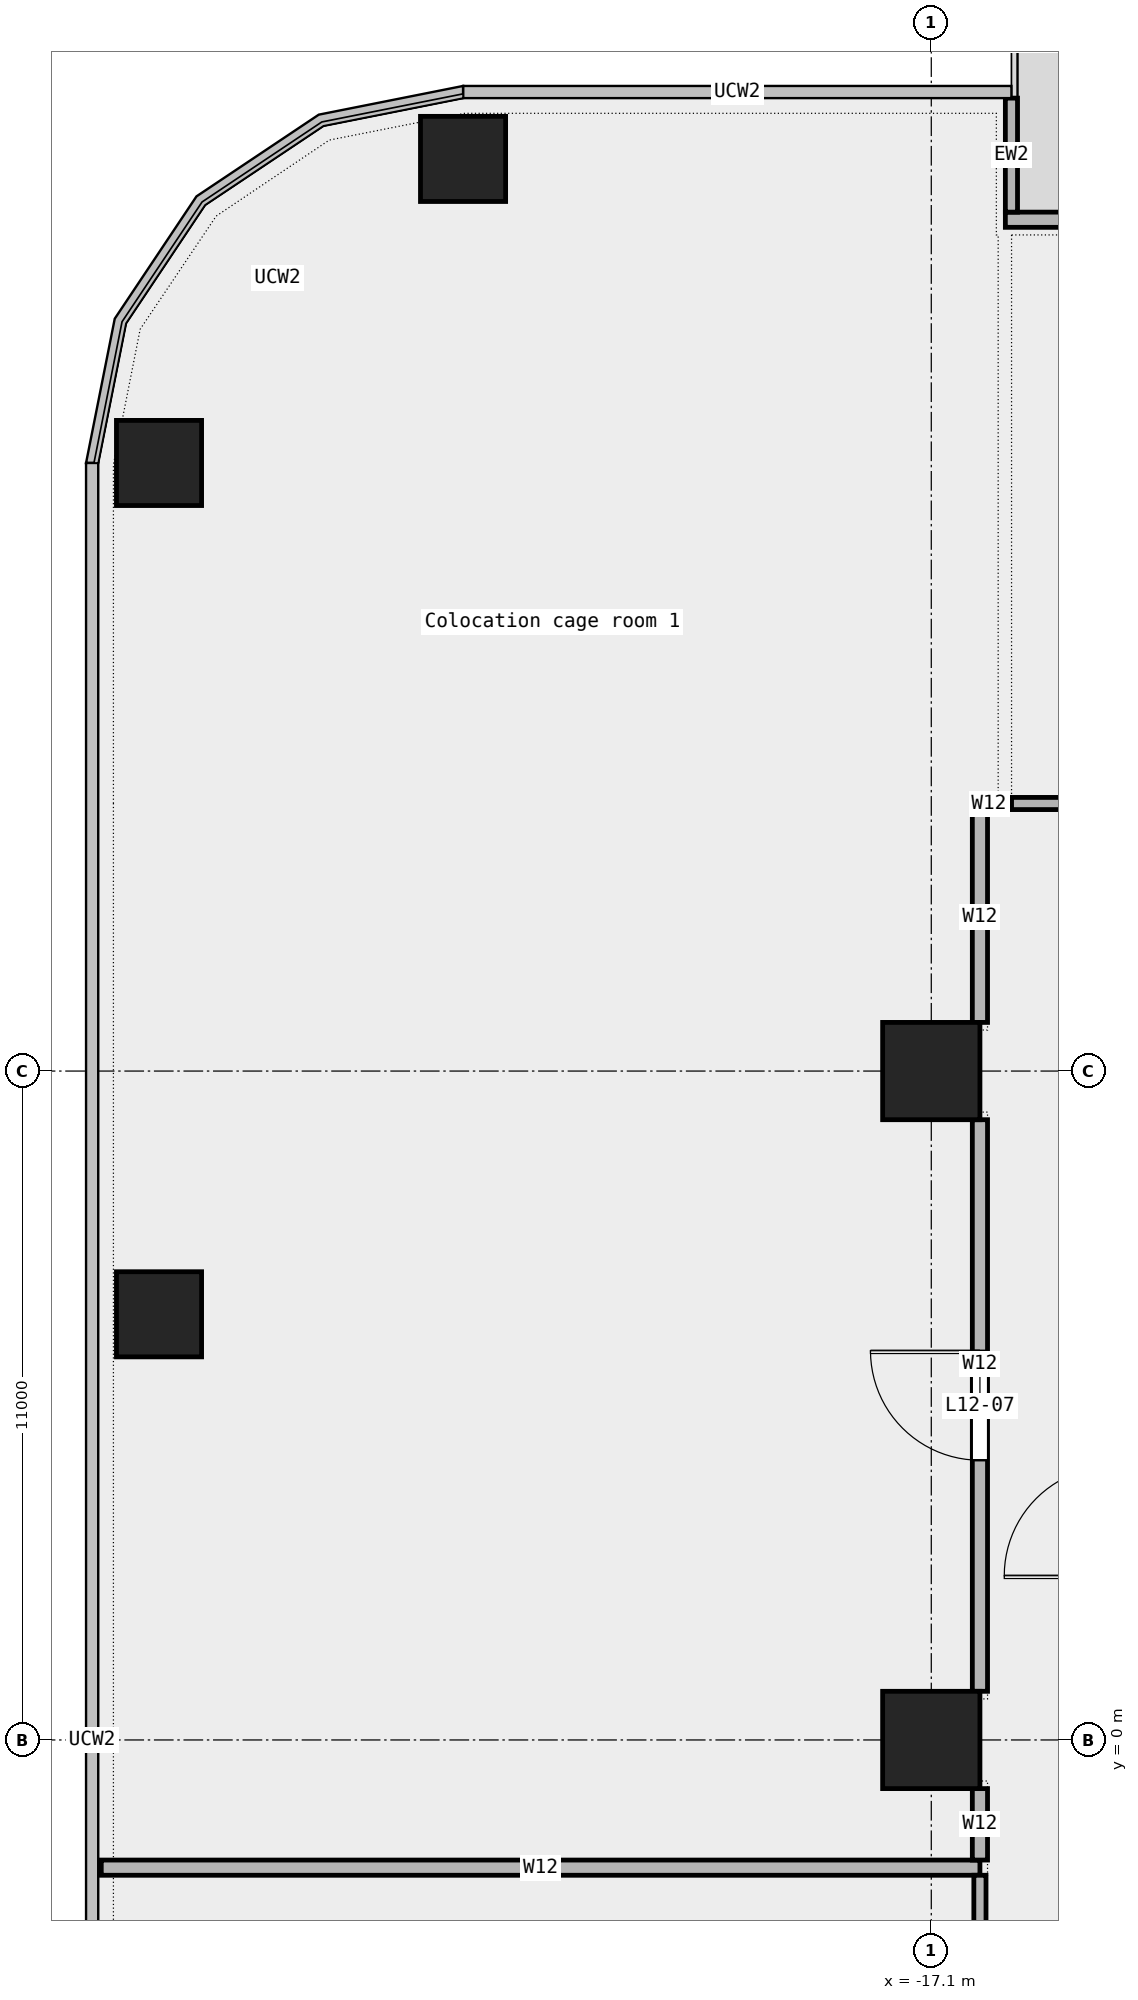
"""IFC4 building model, lengths in metres.
Left out: names, types, materials, properties, quantities, classifications, styles, units other than length and angle.
Written with IfcOpenShell. Run it as: python <this file> out.ifc"""

import sys

from ifc_helpers import new_model, si_unit, direction, frame, frame_2d, origin, origin_2d, place, context, subcontext, project, spatial, rectangle, extrude, element, fill, save


model = new_model("IFC4")
c1 = context("Model", 3, precision=1e-05, world=origin(), true_north=direction((0.0, 1.0)))
c2 = subcontext(c1, "Body", "Model", "MODEL_VIEW")
j1 = project(units=[si_unit("LENGTHUNIT", "METRE"), si_unit("PLANEANGLEUNIT", "RADIAN")], contexts=[c1])
p1 = place(None, origin())
s1 = spatial("IfcSite", under=j1, at=p1, CompositionType="ELEMENT")
p2 = place(p1, origin())
s2 = spatial("IfcBuilding", under=s1, at=p2, CompositionType="ELEMENT")
p3 = place(p2, frame((0.0, 0.0, 64.6)))
s3 = spatial("IfcBuildingStorey", under=s2, at=p3, CompositionType="ELEMENT", Elevation=64.6)
for number, where, z_axis, x_axis in (
    (1, (-24.8, 26.0, 0.0), (0.0, 0.0, 1.0), (1.0, 0.0, 0.0)),
    (2, (-29.8, 21.0, 0.0), (0.0, 0.0, 1.0), (1.0, 0.0, 0.0)),
    (3, (-29.8, 7.0, 0.0), (0.0, 0.0, 1.0), (1.0, 0.0, 0.0)),
):
    element("IfcColumn", number, at=place(p3, frame(where, z_axis=z_axis, x_axis=x_axis)), inside=s3, PredefinedType="COLUMN", context=c2, shape_type="SweptSolid", body=[
        extrude(rectangle(XDim=1.4, YDim=1.4, at=origin_2d()), origin(), (0.0, 0.0, 1.0), 4.35),
    ])
for number, where, z_axis, x_axis in (
    (4, (-17.1, 0.0, 0.0), (0.0, 0.0, 1.0), (1.0, 0.0, 0.0)),
    (5, (-17.1, 11.0, 0.0), (0.0, 0.0, 1.0), (1.0, 0.0, 0.0)),
):
    element("IfcColumn", number, at=place(p3, frame(where, z_axis=z_axis, x_axis=x_axis)), inside=s3, PredefinedType="COLUMN", context=c2, shape_type="SweptSolid", body=[
        extrude(rectangle(XDim=1.6, YDim=1.6, at=origin_2d()), origin(), (0.0, 0.0, 1.0), 4.35),
    ])
p4 = place(p3, frame((-2.155, 25.0, 0.0), z_axis=(0.0, 0.0, 1.0), x_axis=(-1.0, 0.0, 0.0)))
e6 = element("IfcWall", 6, at=p4, inside=s3, PredefinedType="STANDARD", context=c2, shape_type="SweptSolid", body=[
    extrude(rectangle(XDim=13.727, YDim=0.25, at=frame_2d((6.864, 0.0))), origin(), (0.0, 0.0, 1.0), 4.35),
])
p5 = place(p4, frame((1.75, 0.0, 0.45)))
e7 = element("IfcOpeningElement", 7, at=p5, cuts=e6, PredefinedType="OPENING", context=c2, shape_type="SweptSolid", body=[
    extrude(rectangle(XDim=1.5, YDim=3.0, at=frame_2d((0.75, 1.5))), frame((0.0, 0.137, 0.0), z_axis=(0.0, -1.0, 0.0), x_axis=(1.0, 0.0, 0.0)), (0.0, 0.0, 1.0), 0.274),
])
p6 = place(p4, frame((6.0, 0.0, 0.0)))
e8 = element("IfcOpeningElement", 8, at=p6, cuts=e6, PredefinedType="OPENING", context=c2, shape_type="SweptSolid", body=[
    extrude(rectangle(XDim=1.8, YDim=2.4, at=frame_2d((0.9, 1.2))), frame((0.0, 0.137, 0.0), z_axis=(0.0, -1.0, 0.0), x_axis=(1.0, 0.0, 0.0)), (0.0, 0.0, 1.0), 0.274),
])
p7 = place(p4, frame((11.25, 0.0, 0.45)))
e9 = element("IfcOpeningElement", 9, at=p7, cuts=e6, PredefinedType="OPENING", context=c2, shape_type="SweptSolid", body=[
    extrude(rectangle(XDim=1.5, YDim=3.0, at=frame_2d((0.75, 1.5))), frame((0.0, 0.137, 0.0), z_axis=(0.0, -1.0, 0.0), x_axis=(1.0, 0.0, 0.0)), (0.0, 0.0, 1.0), 0.274),
])
p8 = place(p3, frame((-15.782, 27.0, 0.0), z_axis=(0.0, 0.0, 1.0), x_axis=(0.0, -1.0, 0.0)))
e10 = element("IfcWall", 10, at=p8, inside=s3, PredefinedType="STANDARD", context=c2, shape_type="SweptSolid", body=[
    extrude(rectangle(XDim=1.875, YDim=0.2, at=frame_2d((0.938, 0.0))), origin(), (0.0, 0.0, 1.0), 4.35),
])
p9 = place(p3, frame((-30.75, -2.1, 0.0), z_axis=(0.0, 0.0, 1.0), x_axis=(1.0, 0.0, 0.0)))
e11 = element("IfcWall", 11, at=p9, inside=s3, PredefinedType="PARTITIONING", context=c2, shape_type="SweptSolid", body=[
    extrude(rectangle(XDim=14.45, YDim=0.25, at=frame_2d((7.225, 0.0))), origin(), (0.0, 0.0, 1.0), 4.35),
])
p10 = place(p3, frame((-15.78, 15.4, 0.0), z_axis=(0.0, 0.0, 1.0), x_axis=(1.0, 0.0, 0.0)))
e12 = element("IfcWall", 12, at=p10, inside=s3, PredefinedType="PARTITIONING", context=c2, shape_type="SweptSolid", body=[
    extrude(rectangle(XDim=25.965, YDim=0.2, at=frame_2d((12.982, 0.0))), origin(), (0.0, 0.0, 1.0), 4.35),
])
p11 = place(p10, frame((19.395, 0.0, 0.0)))
e13 = element("IfcOpeningElement", 13, at=p11, cuts=e12, PredefinedType="OPENING", context=c2, shape_type="SweptSolid", body=[
    extrude(rectangle(XDim=1.5, YDim=2.1, at=frame_2d((0.75, 1.05))), frame((0.0, 0.112, 0.0), z_axis=(0.0, -1.0, 0.0), x_axis=(1.0, 0.0, 0.0)), (0.0, 0.0, 1.0), 0.224),
])
p12 = place(p10, frame((6.012, 0.0, 0.0)))
e14 = element("IfcOpeningElement", 14, at=p12, cuts=e12, PredefinedType="OPENING", context=c2, shape_type="SweptSolid", body=[
    extrude(rectangle(XDim=1.5, YDim=2.1, at=frame_2d((0.75, 1.05))), frame((0.0, 0.112, 0.0), z_axis=(0.0, -1.0, 0.0), x_axis=(1.0, 0.0, 0.0)), (0.0, 0.0, 1.0), 0.224),
])
p13 = place(p3, frame((-16.3, 15.4, 0.0), z_axis=(0.0, 0.0, 1.0), x_axis=(1.0, 0.0, 0.0)))
e15 = element("IfcWall", 15, at=p13, inside=s3, PredefinedType="PARTITIONING", context=c2, shape_type="SweptSolid", body=[
    extrude(rectangle(XDim=0.3, YDim=0.25, at=frame_2d((0.15, 0.0))), origin(), (0.0, 0.0, 1.0), 4.35),
])
p14 = place(p3, frame((-16.3, -8.975, 0.0), z_axis=(0.0, 0.0, 1.0), x_axis=(0.0, 1.0, 0.0)))
e16 = element("IfcWall", 16, at=p14, inside=s3, PredefinedType="PARTITIONING", context=c2, shape_type="SweptSolid", body=[
    extrude(rectangle(XDim=6.75, YDim=0.2, at=frame_2d((3.375, 0.0))), origin(), (0.0, 0.0, 1.0), 4.35),
])
p15 = place(p14, frame((2.625, 0.0, 0.0)))
e17 = element("IfcOpeningElement", 17, at=p15, cuts=e16, PredefinedType="OPENING", context=c2, shape_type="SweptSolid", body=[
    extrude(rectangle(XDim=1.5, YDim=2.1, at=frame_2d((0.75, 1.05))), frame((0.0, 0.112, 0.0), z_axis=(0.0, -1.0, 0.0), x_axis=(1.0, 0.0, 0.0)), (0.0, 0.0, 1.0), 0.224),
])
p16 = place(p3, frame((-16.3, -1.975, 0.0), z_axis=(0.0, 0.0, 1.0), x_axis=(0.0, 1.0, 0.0)))
e18 = element("IfcWall", 18, at=p16, inside=s3, PredefinedType="PARTITIONING", context=c2, shape_type="SweptSolid", body=[
    extrude(rectangle(XDim=1.175, YDim=0.25, at=frame_2d((0.587, 0.0))), origin(), (0.0, 0.0, 1.0), 4.35),
])
p17 = place(p3, frame((-16.3, 0.8, 0.0), z_axis=(0.0, 0.0, 1.0), x_axis=(0.0, 1.0, 0.0)))
e19 = element("IfcWall", 19, at=p17, inside=s3, PredefinedType="PARTITIONING", context=c2, shape_type="SweptSolid", body=[
    extrude(rectangle(XDim=9.4, YDim=0.25, at=frame_2d((4.7, 0.0))), origin(), (0.0, 0.0, 1.0), 4.35),
])
p18 = place(p17, frame((3.8, 0.0, 0.0)))
e20 = element("IfcOpeningElement", 20, at=p18, cuts=e19, PredefinedType="OPENING", context=c2, shape_type="SweptSolid", body=[
    extrude(rectangle(XDim=1.8, YDim=2.1, at=frame_2d((0.9, 1.05))), frame((0.0, 0.137, 0.0), z_axis=(0.0, -1.0, 0.0), x_axis=(1.0, 0.0, 0.0)), (0.0, 0.0, 1.0), 0.274),
])
p19 = place(p3, frame((-16.3, 11.8, 0.0), z_axis=(0.0, 0.0, 1.0), x_axis=(0.0, 1.0, 0.0)))
e21 = element("IfcWall", 21, at=p19, inside=s3, PredefinedType="PARTITIONING", context=c2, shape_type="SweptSolid", body=[
    extrude(rectangle(XDim=3.475, YDim=0.25, at=frame_2d((1.737, 0.0))), origin(), (0.0, 0.0, 1.0), 4.35),
])
p20 = place(p18, origin())
e22 = element("IfcDoor", 22, at=p20, inside=s3, OperationType="DOUBLE_DOOR_SINGLE_SWING", PredefinedType="DOOR", context=c2, shape_type="SweptSolid", body=[
    extrude(rectangle(XDim=1.8, YDim=2.1, at=frame_2d((0.9, 1.05))), frame((0.0, 0.025, 0.0), z_axis=(0.0, -1.0, 0.0), x_axis=(1.0, 0.0, 0.0)), (0.0, 0.0, 1.0), 0.05),
])
fill(e20, e22)
save(model, sys.argv[1])
